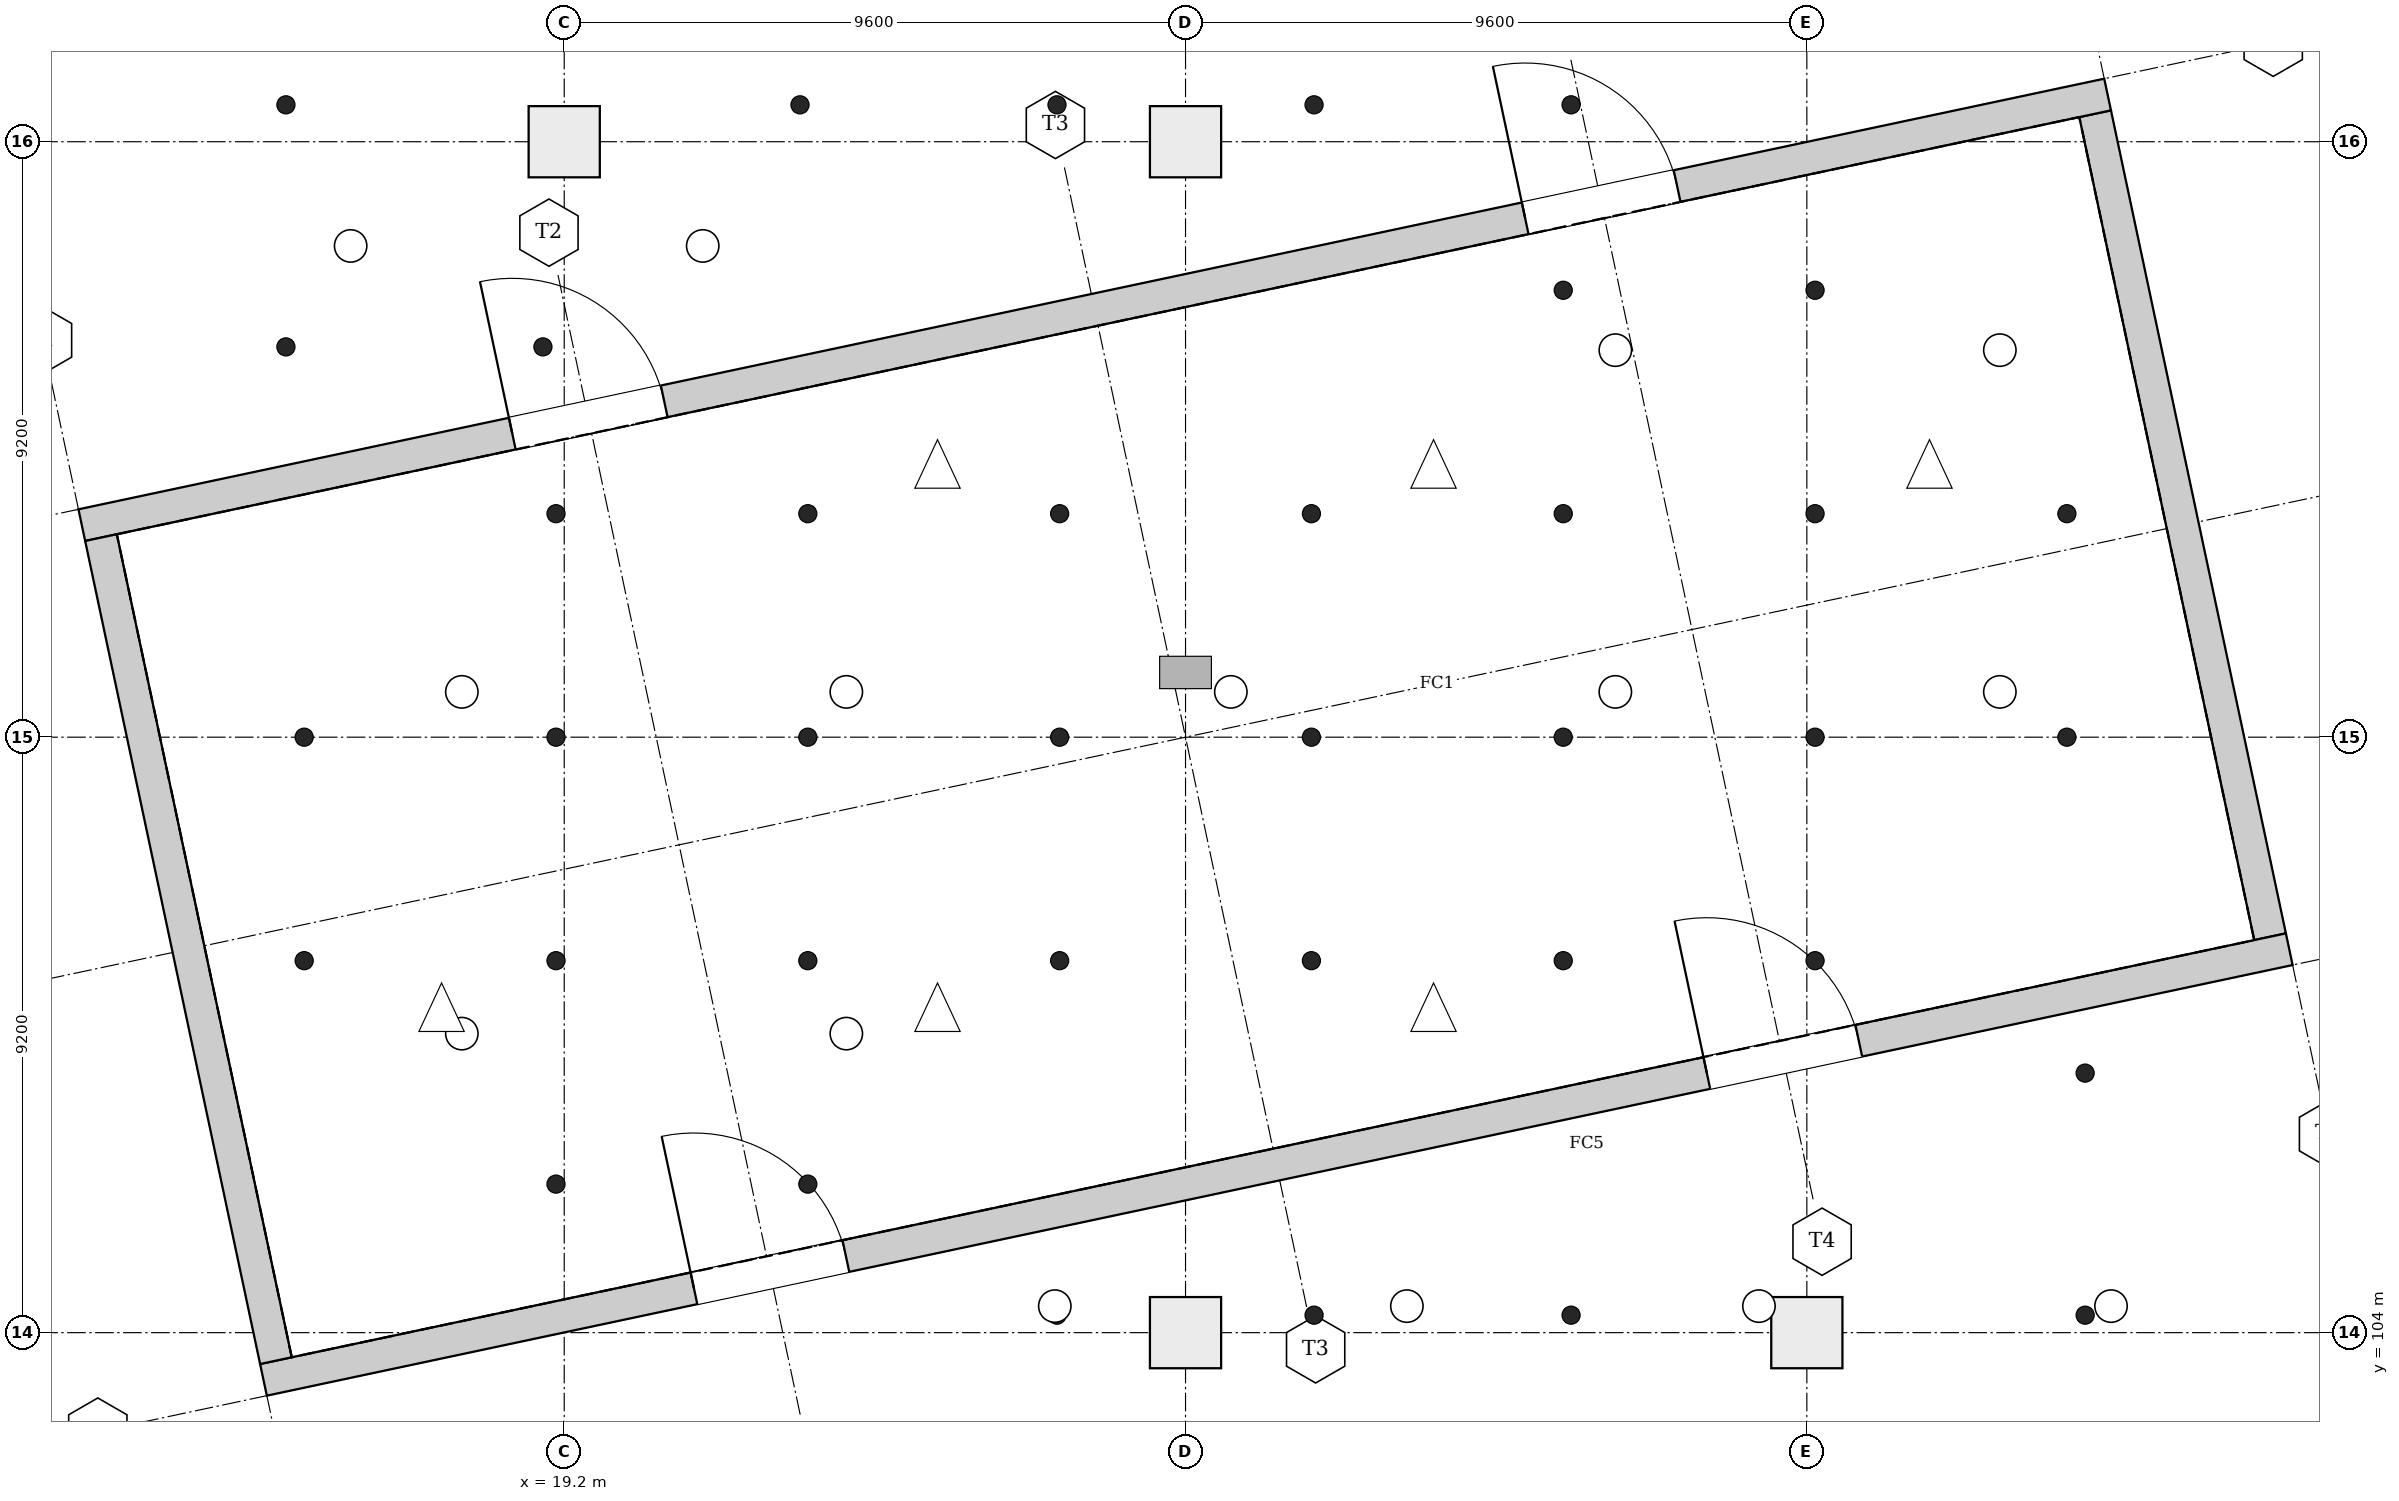
"""IFC4 building model, lengths in metres.
Left out: names, types, materials, properties, quantities, classifications, styles, units other than length and angle.
Written with IfcOpenShell. Run it as: python <this file> out.ifc"""

import sys

from ifc_helpers import new_model, si_unit, direction, frame, frame_2d, origin, origin_2d, place, context, subcontext, project, spatial, rectangle, extrude, element, fill, save


model = new_model("IFC4")
c1 = context("Model", 3, precision=1e-05, world=origin(), true_north=direction((0.0, 1.0)))
c2 = subcontext(c1, "Body", "Model", "MODEL_VIEW")
j1 = project(units=[si_unit("LENGTHUNIT", "METRE"), si_unit("PLANEANGLEUNIT", "RADIAN")], contexts=[c1])
p1 = place(None, origin())
s1 = spatial("IfcSite", under=j1, at=p1, CompositionType="ELEMENT")
p2 = place(p1, origin())
s2 = spatial("IfcBuilding", under=s1, at=p2, CompositionType="ELEMENT")
p3 = place(p2, frame((0.0, 0.0, 14.2)))
s3 = spatial("IfcBuildingStorey", under=s2, at=p3, CompositionType="ELEMENT", Elevation=14.2)
p4 = place(p3, frame((14.553, 103.271, 0.0), z_axis=(0.0, 0.0, 1.0), x_axis=(0.978148301511, 0.207908393895, 0.0)))
e1 = element("IfcWall", 1, at=p4, inside=s3, PredefinedType="SHEAR", context=c2, shape_type="SweptSolid", body=[
    extrude(rectangle(XDim=32.0, YDim=0.5, at=frame_2d((16.0, 0.0))), origin(), (0.0, 0.0, 1.0), 7.5),
])
p5 = place(p4, frame((6.8, 0.0, 0.0)))
e2 = element("IfcOpeningElement", 2, at=p5, cuts=e1, PredefinedType="OPENING", context=c2, shape_type="SweptSolid", body=[
    extrude(rectangle(XDim=2.4, YDim=2.4, at=frame_2d((1.2, 1.2))), frame((0.0, 0.26, 0.0), z_axis=(0.0, -1.0, 0.0), x_axis=(1.0, 0.0, 0.0)), (0.0, 0.0, 1.0), 0.52),
])
p6 = place(p4, frame((22.8, 0.0, 0.0)))
e3 = element("IfcOpeningElement", 3, at=p6, cuts=e1, PredefinedType="OPENING", context=c2, shape_type="SweptSolid", body=[
    extrude(rectangle(XDim=2.4, YDim=2.4, at=frame_2d((1.2, 1.2))), frame((0.0, 0.26, 0.0), z_axis=(0.0, -1.0, 0.0), x_axis=(1.0, 0.0, 0.0)), (0.0, 0.0, 1.0), 0.52),
])
p7 = place(p3, frame((11.746, 116.476, 0.0), z_axis=(0.0, 0.0, 1.0), x_axis=(0.978146420121, 0.207917245089, 0.0)))
e4 = element("IfcWall", 4, at=p7, inside=s3, PredefinedType="SHEAR", context=c2, shape_type="SweptSolid", body=[
    extrude(rectangle(XDim=32.0, YDim=0.5, at=frame_2d((16.0, 0.0))), origin(), (0.0, 0.0, 1.0), 7.5),
])
p8 = place(p7, frame((6.8, 0.0, 0.0)))
e5 = element("IfcOpeningElement", 5, at=p8, cuts=e4, PredefinedType="OPENING", context=c2, shape_type="SweptSolid", body=[
    extrude(rectangle(XDim=2.4, YDim=2.4, at=frame_2d((1.2, 1.2))), frame((0.0, 0.26, 0.0), z_axis=(0.0, -1.0, 0.0), x_axis=(1.0, 0.0, 0.0)), (0.0, 0.0, 1.0), 0.52),
])
p9 = place(p7, frame((22.8, 0.0, 0.0)))
e6 = element("IfcOpeningElement", 6, at=p9, cuts=e4, PredefinedType="OPENING", context=c2, shape_type="SweptSolid", body=[
    extrude(rectangle(XDim=2.4, YDim=2.4, at=frame_2d((1.2, 1.2))), frame((0.0, 0.26, 0.0), z_axis=(0.0, -1.0, 0.0), x_axis=(1.0, 0.0, 0.0)), (0.0, 0.0, 1.0), 0.52),
])
p10 = place(p3, frame((14.746, 103.567, 0.0), z_axis=(0.0, 0.0, 1.0), x_axis=(-0.207911537827, 0.978147633253, 0.0)))
e7 = element("IfcWall", 7, at=p10, inside=s3, PredefinedType="SHEAR", context=c2, shape_type="SweptSolid", body=[
    extrude(rectangle(XDim=13.0, YDim=0.5, at=frame_2d((6.5, 0.0))), origin(), (0.0, 0.0, 1.0), 7.5),
])
p11 = place(p3, frame((45.557, 110.117, 0.0), z_axis=(0.0, 0.0, 1.0), x_axis=(-0.207915357117, 0.978146821431, 0.0)))
e8 = element("IfcWall", 8, at=p11, inside=s3, PredefinedType="SHEAR", context=c2, shape_type="SweptSolid", body=[
    extrude(rectangle(XDim=13.0, YDim=0.5, at=frame_2d((6.5, 0.0))), origin(), (0.0, 0.0, 1.0), 7.5),
])
for number, where, z_axis, x_axis in (
    (9, (28.8, 104.0, 0.0), (0.0, 0.0, 1.0), (1.0, 0.0, 0.0)),
    (10, (38.4, 104.0, 0.0), (0.0, 0.0, 1.0), (1.0, 0.0, 0.0)),
    (11, (19.2, 122.4, 0.0), (0.0, 0.0, 1.0), (1.0, 0.0, 0.0)),
    (12, (28.8, 122.4, 0.0), (0.0, 0.0, 1.0), (1.0, 0.0, 0.0)),
):
    element("IfcColumn", number, at=place(p3, frame(where, z_axis=z_axis, x_axis=x_axis)), inside=s3, PredefinedType="COLUMN", context=c2, shape_type="SweptSolid", body=[
        extrude(rectangle(XDim=1.1, YDim=1.1, at=origin_2d()), origin(), (0.0, 0.0, 1.0), 7.5),
    ])
p12 = place(p5, origin())
e13 = element("IfcDoor", 13, at=p12, inside=s3, OperationType="DOUBLE_DOOR_SINGLE_SWING", PredefinedType="DOOR", context=c2, shape_type="SweptSolid", body=[
    extrude(rectangle(XDim=2.4, YDim=2.4, at=frame_2d((1.2, 1.2))), frame((0.0, 0.025, 0.0), z_axis=(0.0, -1.0, 0.0), x_axis=(1.0, 0.0, 0.0)), (0.0, 0.0, 1.0), 0.05),
])
fill(e2, e13)
p13 = place(p8, origin())
e14 = element("IfcDoor", 14, at=p13, inside=s3, OperationType="DOUBLE_DOOR_SINGLE_SWING", PredefinedType="DOOR", context=c2, shape_type="SweptSolid", body=[
    extrude(rectangle(XDim=2.4, YDim=2.4, at=frame_2d((1.2, 1.2))), frame((0.0, 0.025, 0.0), z_axis=(0.0, -1.0, 0.0), x_axis=(1.0, 0.0, 0.0)), (0.0, 0.0, 1.0), 0.05),
])
fill(e5, e14)
p14 = place(p6, origin())
e15 = element("IfcDoor", 15, at=p14, inside=s3, OperationType="DOUBLE_DOOR_SINGLE_SWING", PredefinedType="DOOR", context=c2, shape_type="SweptSolid", body=[
    extrude(rectangle(XDim=2.4, YDim=2.4, at=frame_2d((1.2, 1.2))), frame((0.0, 0.025, 0.0), z_axis=(0.0, -1.0, 0.0), x_axis=(1.0, 0.0, 0.0)), (0.0, 0.0, 1.0), 0.05),
])
fill(e3, e15)
p15 = place(p9, origin())
e16 = element("IfcDoor", 16, at=p15, inside=s3, OperationType="DOUBLE_DOOR_SINGLE_SWING", PredefinedType="DOOR", context=c2, shape_type="SweptSolid", body=[
    extrude(rectangle(XDim=2.4, YDim=2.4, at=frame_2d((1.2, 1.2))), frame((0.0, 0.025, 0.0), z_axis=(0.0, -1.0, 0.0), x_axis=(1.0, 0.0, 0.0)), (0.0, 0.0, 1.0), 0.05),
])
fill(e6, e16)
save(model, sys.argv[1])
